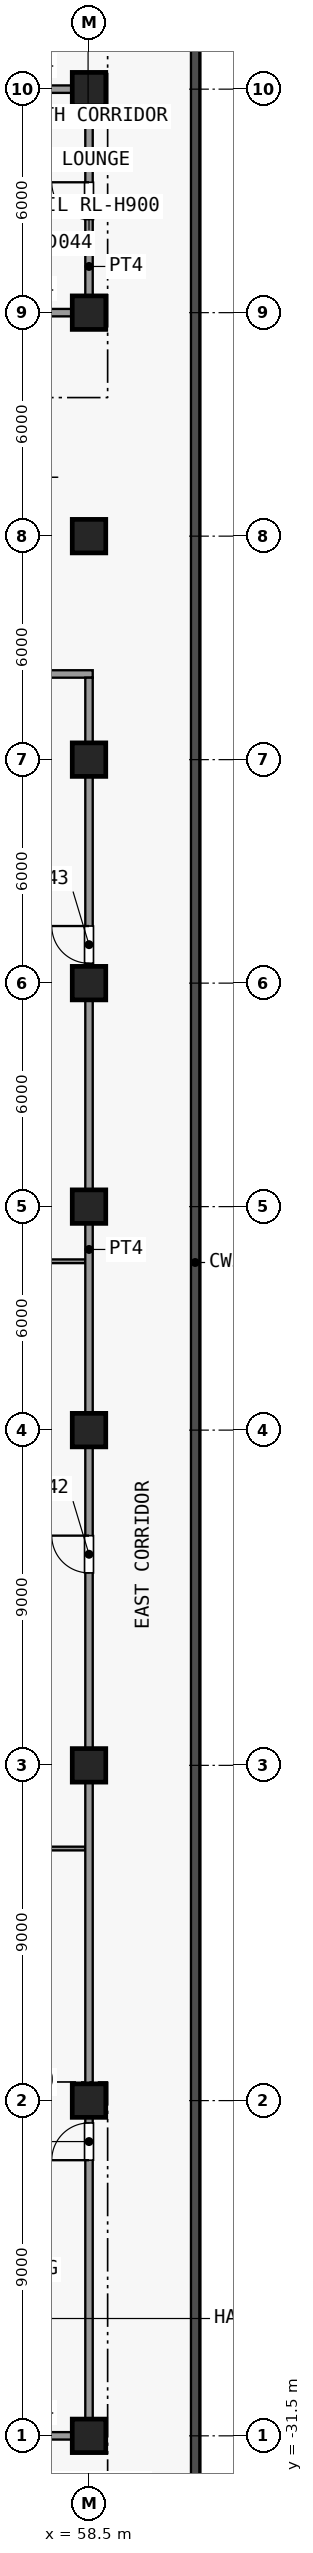
"""IFC4 building model, lengths in metres.
Left out: names, types, materials, properties, quantities, classifications, styles, units other than length and angle.
Written with IfcOpenShell. Run it as: python <this file> out.ifc"""

import sys

from ifc_helpers import new_model, si_unit, direction, frame, frame_2d, origin, origin_2d, place, context, subcontext, project, spatial, rectangle, extrude, element, fill, save


model = new_model("IFC4")
c1 = context("Model", 3, precision=1e-05, world=origin(), true_north=direction((0.0, 1.0)))
c2 = subcontext(c1, "Body", "Model", "MODEL_VIEW")
j1 = project(units=[si_unit("LENGTHUNIT", "METRE"), si_unit("PLANEANGLEUNIT", "RADIAN")], contexts=[c1])
p1 = place(None, origin())
s1 = spatial("IfcSite", under=j1, at=p1, CompositionType="ELEMENT")
p2 = place(p1, origin())
s2 = spatial("IfcBuilding", under=s1, at=p2, CompositionType="ELEMENT")
p3 = place(p2, frame((0.0, 0.0, 8.0)))
s3 = spatial("IfcBuildingStorey", under=s2, at=p3, CompositionType="ELEMENT", Elevation=8.0)
for number, where, z_axis, x_axis in (
    (1, (58.5, -31.5, 0.0), (0.0, 0.0, 1.0), (1.0, 0.0, 0.0)),
    (2, (58.5, -22.5, 0.0), (0.0, 0.0, 1.0), (1.0, 0.0, 0.0)),
    (3, (58.5, -13.5, 0.0), (0.0, 0.0, 1.0), (1.0, 0.0, 0.0)),
    (4, (58.5, -4.5, 0.0), (0.0, 0.0, 1.0), (1.0, 0.0, 0.0)),
    (5, (58.5, 1.5, 0.0), (0.0, 0.0, 1.0), (1.0, 0.0, 0.0)),
    (6, (58.5, 7.5, 0.0), (0.0, 0.0, 1.0), (1.0, 0.0, 0.0)),
    (7, (58.5, 13.5, 0.0), (0.0, 0.0, 1.0), (1.0, 0.0, 0.0)),
    (8, (58.5, 19.5, 0.0), (0.0, 0.0, 1.0), (1.0, 0.0, 0.0)),
    (9, (58.5, 25.5, 0.0), (0.0, 0.0, 1.0), (1.0, 0.0, 0.0)),
    (10, (58.5, 31.5, 0.0), (0.0, 0.0, 1.0), (1.0, 0.0, 0.0)),
):
    element("IfcColumn", number, at=place(p3, frame(where, z_axis=z_axis, x_axis=x_axis)), inside=s3, PredefinedType="COLUMN", context=c2, shape_type="SweptSolid", body=[
        extrude(rectangle(XDim=0.9, YDim=0.9, at=origin_2d()), origin(), (0.0, 0.0, 1.0), 5.5),
    ])
p4 = place(p3, frame((55.6, -31.5, 0.0), z_axis=(0.0, 0.0, 1.0), x_axis=(1.0, 0.0, 0.0)))
e11 = element("IfcWall", 11, at=p4, inside=s3, PredefinedType="PARTITIONING", context=c2, shape_type="SweptSolid", body=[
    extrude(rectangle(XDim=3.0, YDim=0.2, at=frame_2d((1.5, 0.0))), origin(), (0.0, 0.0, 1.0), 5.15),
])
for number, where, z_axis, x_axis in (
    (12, (52.6, -15.733, 0.0), (0.0, 0.0, 1.0), (1.0, 0.0, 0.0)),
    (13, (52.6, 0.033, 0.0), (0.0, 0.0, 1.0), (1.0, 0.0, 0.0)),
):
    element("IfcWall", number, at=place(p3, frame(where, z_axis=z_axis, x_axis=x_axis)), inside=s3, PredefinedType="PARTITIONING", context=c2, shape_type="SweptSolid", body=[
        extrude(rectangle(XDim=5.8, YDim=0.1, at=frame_2d((2.9, 0.0))), origin(), (0.0, 0.0, 1.0), 5.15),
    ])
p5 = place(p3, frame((52.4, 15.8, 0.0), z_axis=(0.0, 0.0, 1.0), x_axis=(1.0, 0.0, 0.0)))
e14 = element("IfcWall", 14, at=p5, inside=s3, PredefinedType="PARTITIONING", context=c2, shape_type="SweptSolid", body=[
    extrude(rectangle(XDim=6.2, YDim=0.2, at=frame_2d((3.1, 0.0))), origin(), (0.0, 0.0, 1.0), 5.15),
])
for number, where, z_axis, x_axis in (
    (15, (55.6, 25.5, 0.0), (0.0, 0.0, 1.0), (1.0, 0.0, 0.0)),
    (16, (55.6, 31.5, 0.0), (0.0, 0.0, 1.0), (1.0, 0.0, 0.0)),
):
    element("IfcWall", number, at=place(p3, frame(where, z_axis=z_axis, x_axis=x_axis)), inside=s3, PredefinedType="PARTITIONING", context=c2, shape_type="SweptSolid", body=[
        extrude(rectangle(XDim=3.0, YDim=0.2, at=frame_2d((1.5, 0.0))), origin(), (0.0, 0.0, 1.0), 5.15),
    ])
p6 = place(p3, frame((58.5, -31.4, 0.0), z_axis=(0.0, 0.0, 1.0), x_axis=(0.0, 1.0, 0.0)))
e17 = element("IfcWall", 17, at=p6, inside=s3, PredefinedType="PARTITIONING", context=c2, shape_type="SweptSolid", body=[
    extrude(rectangle(XDim=47.1, YDim=0.2, at=frame_2d((23.55, 0.0))), origin(), (0.0, 0.0, 1.0), 5.15),
])
p7 = place(p6, frame((7.3, 0.0, 0.0)))
e18 = element("IfcOpeningElement", 18, at=p7, cuts=e17, PredefinedType="OPENING", context=c2, shape_type="SweptSolid", body=[
    extrude(rectangle(XDim=1.0, YDim=2.1, at=frame_2d((0.5, 1.05))), frame((0.0, 0.11, 0.0), z_axis=(0.0, -1.0, 0.0), x_axis=(1.0, 0.0, 0.0)), (0.0, 0.0, 1.0), 0.22),
])
p8 = place(p6, frame((23.067, 0.0, 0.0)))
e19 = element("IfcOpeningElement", 19, at=p8, cuts=e17, PredefinedType="OPENING", context=c2, shape_type="SweptSolid", body=[
    extrude(rectangle(XDim=1.0, YDim=2.1, at=frame_2d((0.5, 1.05))), frame((0.0, 0.11, 0.0), z_axis=(0.0, -1.0, 0.0), x_axis=(1.0, 0.0, 0.0)), (0.0, 0.0, 1.0), 0.22),
])
p9 = place(p6, frame((39.433, 0.0, 0.0)))
e20 = element("IfcOpeningElement", 20, at=p9, cuts=e17, PredefinedType="OPENING", context=c2, shape_type="SweptSolid", body=[
    extrude(rectangle(XDim=1.0, YDim=2.1, at=frame_2d((0.5, 1.05))), frame((0.0, 0.11, 0.0), z_axis=(0.0, -1.0, 0.0), x_axis=(1.0, 0.0, 0.0)), (0.0, 0.0, 1.0), 0.22),
])
p10 = place(p3, frame((58.5, 25.6, 0.0), z_axis=(0.0, 0.0, 1.0), x_axis=(0.0, 1.0, 0.0)))
e21 = element("IfcWall", 21, at=p10, inside=s3, PredefinedType="PARTITIONING", context=c2, shape_type="SweptSolid", body=[
    extrude(rectangle(XDim=5.8, YDim=0.2, at=frame_2d((2.9, 0.0))), origin(), (0.0, 0.0, 1.0), 5.15),
])
p11 = place(p10, frame((2.4, 0.0, 0.0)))
e22 = element("IfcOpeningElement", 22, at=p11, cuts=e21, PredefinedType="OPENING", context=c2, shape_type="SweptSolid", body=[
    extrude(rectangle(XDim=1.0, YDim=2.1, at=frame_2d((0.5, 1.05))), frame((0.0, 0.11, 0.0), z_axis=(0.0, -1.0, 0.0), x_axis=(1.0, 0.0, 0.0)), (0.0, 0.0, 1.0), 0.22),
])
p12 = place(p7, origin())
e23 = element("IfcDoor", 23, at=p12, inside=s3, OperationType="SINGLE_SWING_RIGHT", PredefinedType="DOOR", context=c2, shape_type="SweptSolid", body=[
    extrude(rectangle(XDim=1.0, YDim=2.1, at=frame_2d((0.5, 1.05))), frame((0.0, 0.025, 0.0), z_axis=(0.0, -1.0, 0.0), x_axis=(1.0, 0.0, 0.0)), (0.0, 0.0, 1.0), 0.05),
])
fill(e18, e23)
p13 = place(p8, origin())
e24 = element("IfcDoor", 24, at=p13, inside=s3, OperationType="SINGLE_SWING_LEFT", PredefinedType="DOOR", context=c2, shape_type="SweptSolid", body=[
    extrude(rectangle(XDim=1.0, YDim=2.1, at=frame_2d((0.5, 1.05))), frame((0.0, 0.025, 0.0), z_axis=(0.0, -1.0, 0.0), x_axis=(1.0, 0.0, 0.0)), (0.0, 0.0, 1.0), 0.05),
])
fill(e19, e24)
p14 = place(p9, origin())
e25 = element("IfcDoor", 25, at=p14, inside=s3, OperationType="SINGLE_SWING_LEFT", PredefinedType="DOOR", context=c2, shape_type="SweptSolid", body=[
    extrude(rectangle(XDim=1.0, YDim=2.1, at=frame_2d((0.5, 1.05))), frame((0.0, 0.025, 0.0), z_axis=(0.0, -1.0, 0.0), x_axis=(1.0, 0.0, 0.0)), (0.0, 0.0, 1.0), 0.05),
])
fill(e20, e25)
p15 = place(p11, origin())
e26 = element("IfcDoor", 26, at=p15, inside=s3, OperationType="SINGLE_SWING_LEFT", PredefinedType="DOOR", context=c2, shape_type="SweptSolid", body=[
    extrude(rectangle(XDim=1.0, YDim=2.1, at=frame_2d((0.5, 1.05))), frame((0.0, 0.025, 0.0), z_axis=(0.0, -1.0, 0.0), x_axis=(1.0, 0.0, 0.0)), (0.0, 0.0, 1.0), 0.05),
])
fill(e22, e26)
save(model, sys.argv[1])
